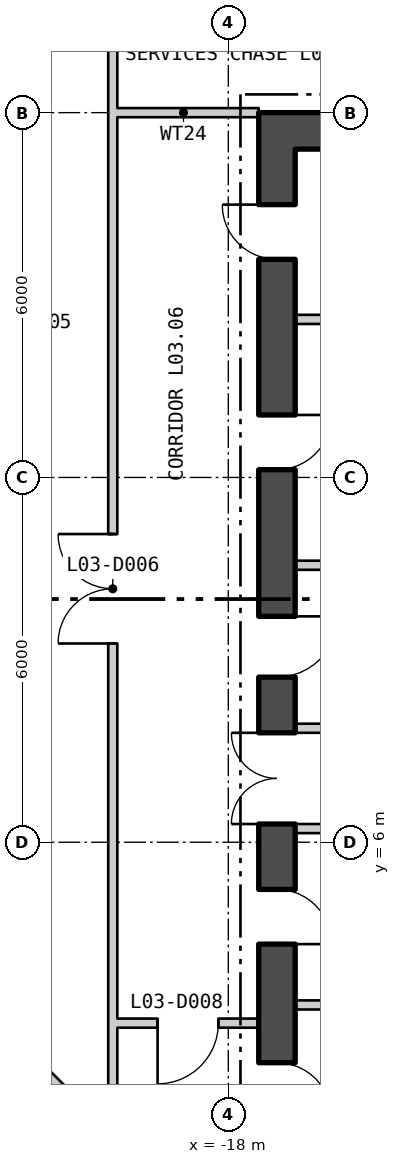
"""IFC4 building model, lengths in metres.
Left out: names, types, materials, properties, quantities, classifications, styles, units other than length and angle.
Written with IfcOpenShell. Run it as: python <this file> out.ifc"""

import sys

from ifc_helpers import new_model, si_unit, direction, frame, frame_2d, origin, place, context, subcontext, project, spatial, rectangle, extrude, element, fill, save


model = new_model("IFC4")
c1 = context("Model", 3, precision=1e-05, world=origin(), true_north=direction((0.0, 1.0)))
c2 = subcontext(c1, "Body", "Model", "MODEL_VIEW")
j1 = project(units=[si_unit("LENGTHUNIT", "METRE"), si_unit("PLANEANGLEUNIT", "RADIAN")], contexts=[c1])
p1 = place(None, origin())
s1 = spatial("IfcSite", under=j1, at=p1, CompositionType="ELEMENT")
p2 = place(p1, origin())
s2 = spatial("IfcBuilding", under=s1, at=p2, CompositionType="ELEMENT")
p3 = place(p2, frame((0.0, 0.0, 18.6)))
s3 = spatial("IfcBuildingStorey", under=s2, at=p3, CompositionType="ELEMENT", Elevation=18.6)
p4 = place(p3, frame((-17.5, 17.7, 0.0), z_axis=(0.0, 0.0, 1.0), x_axis=(1.0, 0.0, 0.0)))
e1 = element("IfcWall", 1, at=p4, inside=s3, PredefinedType="SHEAR", context=c2, shape_type="SweptSolid", body=[
    extrude(rectangle(XDim=35.0, YDim=0.6, at=frame_2d((17.5, 0.0))), origin(), (0.0, 0.0, 1.0), 4.88),
])
p5 = place(p3, frame((-17.2, 0.6, 0.0), z_axis=(0.0, 0.0, 1.0), x_axis=(0.0, 1.0, 0.0)))
e2 = element("IfcWall", 2, at=p5, inside=s3, PredefinedType="SHEAR", context=c2, shape_type="SweptSolid", body=[
    extrude(rectangle(XDim=16.8, YDim=0.6, at=frame_2d((8.4, 0.0))), origin(), (0.0, 0.0, 1.0), 4.88),
])
p6 = place(p5, frame((5.7, 0.0, 0.0)))
e3 = element("IfcOpeningElement", 3, at=p6, cuts=e2, PredefinedType="OPENING", context=c2, shape_type="SweptSolid", body=[
    extrude(rectangle(XDim=1.5, YDim=2.1, at=frame_2d((0.75, 1.05))), frame((0.0, 0.31, 0.0), z_axis=(0.0, -1.0, 0.0), x_axis=(1.0, 0.0, 0.0)), (0.0, 0.0, 1.0), 0.62),
])
p7 = place(p5, frame((0.875, 0.0, 0.0)))
e4 = element("IfcOpeningElement", 4, at=p7, cuts=e2, PredefinedType="OPENING", context=c2, shape_type="SweptSolid", body=[
    extrude(rectangle(XDim=0.9, YDim=2.1, at=frame_2d((0.45, 1.05))), frame((0.0, 0.31, 0.0), z_axis=(0.0, -1.0, 0.0), x_axis=(1.0, 0.0, 0.0)), (0.0, 0.0, 1.0), 0.62),
])
p8 = place(p5, frame((3.724, 0.0, 0.0)))
e5 = element("IfcOpeningElement", 5, at=p8, cuts=e2, PredefinedType="OPENING", context=c2, shape_type="SweptSolid", body=[
    extrude(rectangle(XDim=0.9, YDim=2.1, at=frame_2d((0.45, 1.05))), frame((0.0, 0.31, 0.0), z_axis=(0.0, -1.0, 0.0), x_axis=(1.0, 0.0, 0.0)), (0.0, 0.0, 1.0), 0.62),
])
p9 = place(p5, frame((8.115, 0.0, 0.0)))
e6 = element("IfcOpeningElement", 6, at=p9, cuts=e2, PredefinedType="OPENING", context=c2, shape_type="SweptSolid", body=[
    extrude(rectangle(XDim=1.0, YDim=2.1, at=frame_2d((0.5, 1.05))), frame((0.0, 0.31, 0.0), z_axis=(0.0, -1.0, 0.0), x_axis=(1.0, 0.0, 0.0)), (0.0, 0.0, 1.0), 0.62),
])
p10 = place(p5, frame((11.528, 0.0, 0.0)))
e7 = element("IfcOpeningElement", 7, at=p10, cuts=e2, PredefinedType="OPENING", context=c2, shape_type="SweptSolid", body=[
    extrude(rectangle(XDim=0.9, YDim=2.1, at=frame_2d((0.45, 1.05))), frame((0.0, 0.31, 0.0), z_axis=(0.0, -1.0, 0.0), x_axis=(1.0, 0.0, 0.0)), (0.0, 0.0, 1.0), 0.62),
])
p11 = place(p5, frame((14.987, 0.0, 0.0)))
e8 = element("IfcOpeningElement", 8, at=p11, cuts=e2, PredefinedType="OPENING", context=c2, shape_type="SweptSolid", body=[
    extrude(rectangle(XDim=0.9, YDim=2.1, at=frame_2d((0.45, 1.05))), frame((0.0, 0.31, 0.0), z_axis=(0.0, -1.0, 0.0), x_axis=(1.0, 0.0, 0.0)), (0.0, 0.0, 1.0), 0.62),
])
for number, where, z_axis, x_axis in (
    (9, (-16.9, 6.225, 0.0), (0.0, 0.0, 1.0), (1.0, 0.0, 0.0)),
    (10, (-16.9, 7.875, 0.0), (0.0, 0.0, 1.0), (1.0, 0.0, 0.0)),
    (11, (-16.9, 3.324, 0.0), (0.0, 0.0, 1.0), (1.0, 0.0, 0.0)),
    (12, (-16.9, 10.556, 0.0), (0.0, 0.0, 1.0), (1.0, 0.0, 0.0)),
    (13, (-16.9, 14.6, 0.0), (0.0, 0.0, 1.0), (1.0, 0.0, 0.0)),
):
    element("IfcWall", number, at=place(p3, frame(where, z_axis=z_axis, x_axis=x_axis)), inside=s3, PredefinedType="PARTITIONING", context=c2, shape_type="SweptSolid", body=[
        extrude(rectangle(XDim=2.4, YDim=0.15, at=frame_2d((1.2, 0.0))), origin(), (0.0, 0.0, 1.0), 4.88),
    ])
p12 = place(p3, frame((-25.392, 6.592, 0.0), z_axis=(0.0, 0.0, 1.0), x_axis=(0.707106781187, -0.707106781187, 0.0)))
e14 = element("IfcWall", 14, at=p12, inside=s3, PredefinedType="PARTITIONING", context=c2, shape_type="SweptSolid", body=[
    extrude(rectangle(XDim=7.586, YDim=0.15, at=frame_2d((3.793, 0.0))), origin(), (0.0, 0.0, 1.0), 4.88),
])
p13 = place(p3, frame((-19.975, 18.0, 0.0), z_axis=(0.0, 0.0, 1.0), x_axis=(1.0, 0.0, 0.0)))
e15 = element("IfcWall", 15, at=p13, inside=s3, PredefinedType="PARTITIONING", context=c2, shape_type="SweptSolid", body=[
    extrude(rectangle(XDim=2.475, YDim=0.15, at=frame_2d((1.238, 0.0))), origin(), (0.0, 0.0, 1.0), 4.33),
])
p14 = place(p3, frame((-19.9, 1.025, 0.0), z_axis=(0.0, 0.0, 1.0), x_axis=(0.0, 1.0, 0.0)))
e16 = element("IfcWall", 16, at=p14, inside=s3, PredefinedType="PARTITIONING", context=c2, shape_type="SweptSolid", body=[
    extrude(rectangle(XDim=16.9, YDim=0.15, at=frame_2d((8.45, 0.0))), origin(), (0.0, 0.0, 1.0), 4.88),
])
p15 = place(p14, frame((8.244, 0.0, 0.0)))
e17 = element("IfcOpeningElement", 17, at=p15, cuts=e16, PredefinedType="OPENING", context=c2, shape_type="SweptSolid", body=[
    extrude(rectangle(XDim=1.8, YDim=2.1, at=frame_2d((0.9, 1.05))), frame((0.0, 0.085, 0.0), z_axis=(0.0, -1.0, 0.0), x_axis=(1.0, 0.0, 0.0)), (0.0, 0.0, 1.0), 0.17),
])
p16 = place(p3, frame((-19.9, 18.075, 0.0), z_axis=(0.0, 0.0, 1.0), x_axis=(0.0, 1.0, 0.0)))
e18 = element("IfcWall", 18, at=p16, inside=s3, PredefinedType="PARTITIONING", context=c2, shape_type="SweptSolid", body=[
    extrude(rectangle(XDim=1.675, YDim=0.15, at=frame_2d((0.838, 0.0))), origin(), (0.0, 0.0, 1.0), 4.88),
])
p17 = place(p3, frame((-19.825, 3.025, 0.0), z_axis=(0.0, 0.0, 1.0), x_axis=(1.0, 0.0, 0.0)))
e19 = element("IfcWall", 19, at=p17, inside=s3, PredefinedType="PARTITIONING", context=c2, shape_type="SweptSolid", body=[
    extrude(rectangle(XDim=2.325, YDim=0.15, at=frame_2d((1.163, 0.0))), origin(), (0.0, 0.0, 1.0), 4.33),
])
p18 = place(p17, frame((0.662, 0.0, 0.0)))
e20 = element("IfcOpeningElement", 20, at=p18, cuts=e19, PredefinedType="OPENING", context=c2, shape_type="SweptSolid", body=[
    extrude(rectangle(XDim=1.0, YDim=2.1, at=frame_2d((0.5, 1.05))), frame((0.0, 0.085, 0.0), z_axis=(0.0, -1.0, 0.0), x_axis=(1.0, 0.0, 0.0)), (0.0, 0.0, 1.0), 0.17),
])
p19 = place(p6, origin())
e21 = element("IfcDoor", 21, at=p19, inside=s3, OperationType="DOUBLE_DOOR_SINGLE_SWING", PredefinedType="DOOR", context=c2, shape_type="SweptSolid", body=[
    extrude(rectangle(XDim=1.5, YDim=2.1, at=frame_2d((0.75, 1.05))), frame((0.0, 0.025, 0.0), z_axis=(0.0, -1.0, 0.0), x_axis=(1.0, 0.0, 0.0)), (0.0, 0.0, 1.0), 0.05),
])
fill(e3, e21)
p20 = place(p7, origin())
e22 = element("IfcDoor", 22, at=p20, inside=s3, OperationType="SINGLE_SWING_LEFT", PredefinedType="DOOR", context=c2, shape_type="SweptSolid", body=[
    extrude(rectangle(XDim=0.9, YDim=2.1, at=frame_2d((0.45, 1.05))), frame((0.0, 0.025, 0.0), z_axis=(0.0, -1.0, 0.0), x_axis=(1.0, 0.0, 0.0)), (0.0, 0.0, 1.0), 0.05),
])
fill(e4, e22)
p21 = place(p8, origin())
e23 = element("IfcDoor", 23, at=p21, inside=s3, OperationType="SINGLE_SWING_LEFT", PredefinedType="DOOR", context=c2, shape_type="SweptSolid", body=[
    extrude(rectangle(XDim=0.9, YDim=2.1, at=frame_2d((0.45, 1.05))), frame((0.0, 0.025, 0.0), z_axis=(0.0, -1.0, 0.0), x_axis=(1.0, 0.0, 0.0)), (0.0, 0.0, 1.0), 0.05),
])
fill(e5, e23)
p22 = place(p9, origin())
e24 = element("IfcDoor", 24, at=p22, inside=s3, OperationType="SINGLE_SWING_RIGHT", PredefinedType="DOOR", context=c2, shape_type="SweptSolid", body=[
    extrude(rectangle(XDim=1.0, YDim=2.1, at=frame_2d((0.5, 1.05))), frame((0.0, 0.025, 0.0), z_axis=(0.0, -1.0, 0.0), x_axis=(1.0, 0.0, 0.0)), (0.0, 0.0, 1.0), 0.05),
])
fill(e6, e24)
p23 = place(p10, origin())
e25 = element("IfcDoor", 25, at=p23, inside=s3, OperationType="SINGLE_SWING_RIGHT", PredefinedType="DOOR", context=c2, shape_type="SweptSolid", body=[
    extrude(rectangle(XDim=0.9, YDim=2.1, at=frame_2d((0.45, 1.05))), frame((0.0, 0.025, 0.0), z_axis=(0.0, -1.0, 0.0), x_axis=(1.0, 0.0, 0.0)), (0.0, 0.0, 1.0), 0.05),
])
fill(e7, e25)
p24 = place(p11, origin())
e26 = element("IfcDoor", 26, at=p24, inside=s3, OperationType="SINGLE_SWING_LEFT", PredefinedType="DOOR", context=c2, shape_type="SweptSolid", body=[
    extrude(rectangle(XDim=0.9, YDim=2.1, at=frame_2d((0.45, 1.05))), frame((0.0, 0.025, 0.0), z_axis=(0.0, -1.0, 0.0), x_axis=(1.0, 0.0, 0.0)), (0.0, 0.0, 1.0), 0.05),
])
fill(e8, e26)
p25 = place(p15, origin())
e27 = element("IfcDoor", 27, at=p25, inside=s3, OperationType="DOUBLE_DOOR_SINGLE_SWING", PredefinedType="DOOR", context=c2, shape_type="SweptSolid", body=[
    extrude(rectangle(XDim=1.8, YDim=2.1, at=frame_2d((0.9, 1.05))), frame((0.0, 0.025, 0.0), z_axis=(0.0, -1.0, 0.0), x_axis=(1.0, 0.0, 0.0)), (0.0, 0.0, 1.0), 0.05),
])
fill(e17, e27)
p26 = place(p18, origin())
e28 = element("IfcDoor", 28, at=p26, inside=s3, OperationType="SINGLE_SWING_LEFT", PredefinedType="DOOR", context=c2, shape_type="SweptSolid", body=[
    extrude(rectangle(XDim=1.0, YDim=2.1, at=frame_2d((0.5, 1.05))), frame((0.0, 0.025, 0.0), z_axis=(0.0, -1.0, 0.0), x_axis=(1.0, 0.0, 0.0)), (0.0, 0.0, 1.0), 0.05),
])
fill(e20, e28)
save(model, sys.argv[1])
